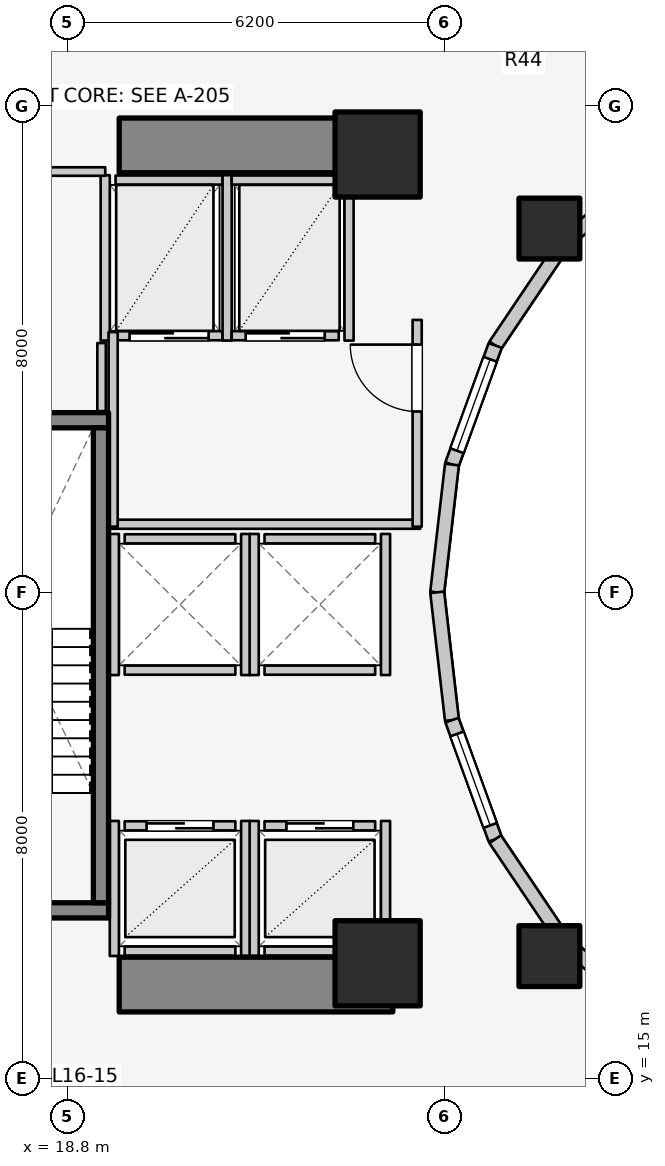
"""IFC4 building model, lengths in metres.
Left out: names, types, materials, properties, quantities, classifications, styles, units other than length and angle.
Written with IfcOpenShell. Run it as: python <this file> out.ifc"""

import sys

from ifc_helpers import new_model, si_unit, direction, frame, frame_2d, origin, origin_2d, place, context, subcontext, project, spatial, rectangle, extrude, element, fill, save


model = new_model("IFC4")
c1 = context("Model", 3, precision=1e-05, world=origin(), true_north=direction((0.0, 1.0)))
c2 = subcontext(c1, "Body", "Model", "MODEL_VIEW")
j1 = project(units=[si_unit("LENGTHUNIT", "METRE"), si_unit("PLANEANGLEUNIT", "RADIAN")], contexts=[c1])
p1 = place(None, origin())
s1 = spatial("IfcSite", under=j1, at=p1, CompositionType="ELEMENT")
p2 = place(p1, origin())
s2 = spatial("IfcBuilding", under=s1, at=p2, CompositionType="ELEMENT")
p3 = place(p2, frame((0.0, 0.0, 55.5)))
s3 = spatial("IfcBuildingStorey", under=s2, at=p3, CompositionType="ELEMENT", Elevation=55.5)
for number, where, z_axis, x_axis in (
    (1, (19.65, 16.55, 0.0), (0.0, 0.0, 1.0), (1.0, 0.0, 0.0)),
    (2, (19.65, 30.35, 0.0), (0.0, 0.0, 1.0), (1.0, 0.0, 0.0)),
):
    element("IfcWall", number, at=place(p3, frame(where, z_axis=z_axis, x_axis=x_axis)), inside=s3, PredefinedType="SHEAR", context=c2, shape_type="SweptSolid", body=[
        extrude(rectangle(XDim=4.5, YDim=0.9, at=frame_2d((2.25, 0.0))), origin(), (0.0, 0.0, 1.0), 3.1),
    ])
p4 = place(p3, frame((16.105, 17.77, 0.0), z_axis=(0.0, 0.0, 1.0), x_axis=(1.0, 0.0, 0.0)))
e3 = element("IfcWall", 3, at=p4, inside=s3, PredefinedType="SOLIDWALL", context=c2, shape_type="SweptSolid", body=[
    extrude(rectangle(XDim=3.37, YDim=0.25, at=frame_2d((1.685, 0.0))), origin(), (0.0, 0.0, 1.0), 3.1),
])
p5 = place(p4, frame((1.135, 0.0, 0.0)))
e4 = element("IfcOpeningElement", 4, at=p5, cuts=e3, PredefinedType="OPENING", context=c2, shape_type="SweptSolid", body=[
    extrude(rectangle(XDim=1.1, YDim=2.1, at=frame_2d((0.55, 1.05))), frame((0.0, 0.135, 0.0), z_axis=(0.0, -1.0, 0.0), x_axis=(1.0, 0.0, 0.0)), (0.0, 0.0, 1.0), 0.27),
])
p6 = place(p3, frame((16.105, 25.83, 0.0), z_axis=(0.0, 0.0, 1.0), x_axis=(1.0, 0.0, 0.0)))
e5 = element("IfcWall", 5, at=p6, inside=s3, PredefinedType="SOLIDWALL", context=c2, shape_type="SweptSolid", body=[
    extrude(rectangle(XDim=3.37, YDim=0.25, at=frame_2d((1.685, 0.0))), origin(), (0.0, 0.0, 1.0), 3.1),
])
p7 = place(p3, frame((19.35, 17.895, 0.0), z_axis=(0.0, 0.0, 1.0), x_axis=(0.0, 1.0, 0.0)))
e6 = element("IfcWall", 6, at=p7, inside=s3, PredefinedType="SOLIDWALL", context=c2, shape_type="SweptSolid", body=[
    extrude(rectangle(XDim=7.81, YDim=0.25, at=frame_2d((3.905, 0.0))), origin(), (0.0, 0.0, 1.0), 3.1),
])
for number, where, z_axis, x_axis in (
    (7, (23.9, 16.9, 0.0), (0.0, 0.0, 1.0), (1.0, 0.0, 0.0)),
    (8, (23.9, 30.2, 0.0), (0.0, 0.0, 1.0), (1.0, 0.0, 0.0)),
):
    element("IfcColumn", number, at=place(p3, frame(where, z_axis=z_axis, x_axis=x_axis)), inside=s3, PredefinedType="COLUMN", context=c2, shape_type="SweptSolid", body=[
        extrude(rectangle(XDim=1.4, YDim=1.4, at=origin_2d()), origin(), (0.0, 0.0, 1.0), 3.1),
    ])
for number, where, z_axis, x_axis in (
    (9, (26.725, 28.982, 0.0), (0.0, 0.0, 1.0), (1.0, 0.0, 0.0)),
    (10, (26.725, 17.018, 0.0), (0.0, 0.0, 1.0), (1.0, 0.0, 0.0)),
):
    element("IfcColumn", number, at=place(p3, frame(where, z_axis=z_axis, x_axis=x_axis)), inside=s3, PredefinedType="COLUMN", context=c2, shape_type="SweptSolid", body=[
        extrude(rectangle(XDim=1.0, YDim=1.0, at=origin_2d()), origin(), (0.0, 0.0, 1.0), 3.1),
    ])
p8 = place(p3, frame((28.44, 30.032, 0.0), z_axis=(0.0, 0.0, 1.0), x_axis=(-0.752576694707, -0.658504607869, 0.0)))
e11 = element("IfcWall", 11, at=p8, inside=s3, PredefinedType="STANDARD", context=c2, shape_type="SweptSolid", body=[
    extrude(rectangle(XDim=1.959, YDim=0.23, at=frame_2d((0.98, 0.0))), origin(), (0.0, 0.0, 1.0), 2.16),
])
p9 = place(p3, frame((26.965, 28.742, 0.0), z_axis=(0.0, 0.0, 1.0), x_axis=(-0.558197800898, -0.829707909492, 0.0)))
e12 = element("IfcWall", 12, at=p9, inside=s3, PredefinedType="STANDARD", context=c2, shape_type="SweptSolid", body=[
    extrude(rectangle(XDim=2.027, YDim=0.23, at=frame_2d((1.013, 0.0))), origin(), (0.0, 0.0, 1.0), 2.16),
])
p10 = place(p3, frame((25.834, 27.06, 0.0), z_axis=(0.0, 0.0, 1.0), x_axis=(-0.341423187295, -0.93990968033, 0.0)))
e13 = element("IfcWall", 13, at=p10, inside=s3, PredefinedType="STANDARD", context=c2, shape_type="SweptSolid", body=[
    extrude(rectangle(XDim=2.084, YDim=0.23, at=frame_2d((1.042, 0.0))), origin(), (0.0, 0.0, 1.0), 2.84),
])
p11 = place(p10, frame((0.242, 0.0, 0.85)))
e14 = element("IfcOpeningElement", 14, at=p11, cuts=e13, PredefinedType="OPENING", context=c2, shape_type="SweptSolid", body=[
    extrude(rectangle(XDim=1.6, YDim=1.65, at=frame_2d((0.8, 0.825))), frame((0.0, 0.125, 0.0), z_axis=(0.0, -1.0, 0.0), x_axis=(1.0, 0.0, 0.0)), (0.0, 0.0, 1.0), 0.25),
])
for number, where, z_axis, x_axis in (
    (15, (25.123, 25.102, 0.0), (0.0, 0.0, 1.0), (-0.115, -0.993, 0.0)),
    (16, (24.88, 23.0, 0.0), (0.0, 0.0, 1.0), (0.115, -0.993, 0.0)),
):
    element("IfcWall", number, at=place(p3, frame(where, z_axis=z_axis, x_axis=x_axis)), inside=s3, PredefinedType="STANDARD", context=c2, shape_type="SweptSolid", body=[
        extrude(rectangle(XDim=2.115, YDim=0.23, at=frame_2d((1.058, 0.0))), origin(), (0.0, 0.0, 1.0), 2.84),
    ])
p12 = place(p3, frame((25.123, 20.898, 0.0), z_axis=(0.0, 0.0, 1.0), x_axis=(0.341423187295, -0.93990968033, 0.0)))
e17 = element("IfcWall", 17, at=p12, inside=s3, PredefinedType="STANDARD", context=c2, shape_type="SweptSolid", body=[
    extrude(rectangle(XDim=2.084, YDim=0.23, at=frame_2d((1.042, 0.0))), origin(), (0.0, 0.0, 1.0), 2.84),
])
p13 = place(p12, frame((0.242, 0.0, 0.85)))
e18 = element("IfcOpeningElement", 18, at=p13, cuts=e17, PredefinedType="OPENING", context=c2, shape_type="SweptSolid", body=[
    extrude(rectangle(XDim=1.6, YDim=1.65, at=frame_2d((0.8, 0.825))), frame((0.0, 0.125, 0.0), z_axis=(0.0, -1.0, 0.0), x_axis=(1.0, 0.0, 0.0)), (0.0, 0.0, 1.0), 0.25),
])
p14 = place(p3, frame((25.834, 18.94, 0.0), z_axis=(0.0, 0.0, 1.0), x_axis=(0.558197800898, -0.829707909492, 0.0)))
e19 = element("IfcWall", 19, at=p14, inside=s3, PredefinedType="STANDARD", context=c2, shape_type="SweptSolid", body=[
    extrude(rectangle(XDim=2.027, YDim=0.23, at=frame_2d((1.013, 0.0))), origin(), (0.0, 0.0, 1.0), 2.16),
])
p15 = place(p3, frame((26.965, 17.258, 0.0), z_axis=(0.0, 0.0, 1.0), x_axis=(0.752576694707, -0.658504607869, 0.0)))
e20 = element("IfcWall", 20, at=p15, inside=s3, PredefinedType="STANDARD", context=c2, shape_type="SweptSolid", body=[
    extrude(rectangle(XDim=1.959, YDim=0.23, at=frame_2d((0.98, 0.0))), origin(), (0.0, 0.0, 1.0), 2.16),
])
p16 = place(p3, frame((19.74, 19.16, 0.0), z_axis=(0.0, 0.0, 1.0), x_axis=(1.0, 0.0, 0.0)))
e21 = element("IfcWall", 21, at=p16, inside=s3, PredefinedType="SOLIDWALL", context=c2, shape_type="SweptSolid", body=[
    extrude(rectangle(XDim=1.82, YDim=0.15, at=frame_2d((0.91, 0.0))), origin(), (0.0, 0.0, 1.0), 2.855),
])
p17 = place(p16, frame((0.36, 0.0, 0.0)))
e22 = element("IfcOpeningElement", 22, at=p17, cuts=e21, PredefinedType="OPENING", context=c2, shape_type="SweptSolid", body=[
    extrude(rectangle(XDim=1.1, YDim=2.1, at=frame_2d((0.55, 1.05))), frame((0.0, 0.085, 0.0), z_axis=(0.0, -1.0, 0.0), x_axis=(1.0, 0.0, 0.0)), (0.0, 0.0, 1.0), 0.17),
])
p18 = place(p3, frame((19.74, 17.1, 0.0), z_axis=(0.0, 0.0, 1.0), x_axis=(1.0, 0.0, 0.0)))
e23 = element("IfcWall", 23, at=p18, inside=s3, PredefinedType="SOLIDWALL", context=c2, shape_type="SweptSolid", body=[
    extrude(rectangle(XDim=1.82, YDim=0.15, at=frame_2d((0.91, 0.0))), origin(), (0.0, 0.0, 1.0), 2.855),
])
p19 = place(p3, frame((19.57, 17.02, 0.0), z_axis=(0.0, 0.0, 1.0), x_axis=(0.0, 1.0, 0.0)))
e24 = element("IfcWall", 24, at=p19, inside=s3, PredefinedType="SOLIDWALL", context=c2, shape_type="SweptSolid", body=[
    extrude(rectangle(XDim=2.22, YDim=0.15, at=frame_2d((1.11, 0.0))), origin(), (0.0, 0.0, 1.0), 2.12),
])
p20 = place(p3, frame((21.73, 17.02, 0.0), z_axis=(0.0, 0.0, 1.0), x_axis=(0.0, 1.0, 0.0)))
e25 = element("IfcWall", 25, at=p20, inside=s3, PredefinedType="SOLIDWALL", context=c2, shape_type="SweptSolid", body=[
    extrude(rectangle(XDim=2.22, YDim=0.15, at=frame_2d((1.11, 0.0))), origin(), (0.0, 0.0, 1.0), 2.855),
])
p21 = place(p3, frame((22.04, 19.16, 0.0), z_axis=(0.0, 0.0, 1.0), x_axis=(1.0, 0.0, 0.0)))
e26 = element("IfcWall", 26, at=p21, inside=s3, PredefinedType="SOLIDWALL", context=c2, shape_type="SweptSolid", body=[
    extrude(rectangle(XDim=1.82, YDim=0.15, at=frame_2d((0.91, 0.0))), origin(), (0.0, 0.0, 1.0), 2.12),
])
p22 = place(p21, frame((0.36, 0.0, 0.0)))
e27 = element("IfcOpeningElement", 27, at=p22, cuts=e26, PredefinedType="OPENING", context=c2, shape_type="SweptSolid", body=[
    extrude(rectangle(XDim=1.1, YDim=2.1, at=frame_2d((0.55, 1.05))), frame((0.0, 0.085, 0.0), z_axis=(0.0, -1.0, 0.0), x_axis=(1.0, 0.0, 0.0)), (0.0, 0.0, 1.0), 0.17),
])
p23 = place(p3, frame((22.04, 17.1, 0.0), z_axis=(0.0, 0.0, 1.0), x_axis=(1.0, 0.0, 0.0)))
e28 = element("IfcWall", 28, at=p23, inside=s3, PredefinedType="SOLIDWALL", context=c2, shape_type="SweptSolid", body=[
    extrude(rectangle(XDim=1.82, YDim=0.15, at=frame_2d((0.91, 0.0))), origin(), (0.0, 0.0, 1.0), 2.12),
])
p24 = place(p3, frame((21.87, 17.02, 0.0), z_axis=(0.0, 0.0, 1.0), x_axis=(0.0, 1.0, 0.0)))
e29 = element("IfcWall", 29, at=p24, inside=s3, PredefinedType="SOLIDWALL", context=c2, shape_type="SweptSolid", body=[
    extrude(rectangle(XDim=2.22, YDim=0.15, at=frame_2d((1.11, 0.0))), origin(), (0.0, 0.0, 1.0), 2.855),
])
p25 = place(p3, frame((24.03, 17.02, 0.0), z_axis=(0.0, 0.0, 1.0), x_axis=(0.0, 1.0, 0.0)))
e30 = element("IfcWall", 30, at=p25, inside=s3, PredefinedType="SOLIDWALL", context=c2, shape_type="SweptSolid", body=[
    extrude(rectangle(XDim=2.22, YDim=0.15, at=frame_2d((1.11, 0.0))), origin(), (0.0, 0.0, 1.0), 2.12),
])
for number, where, z_axis, x_axis in (
    (31, (19.74, 21.72, 0.0), (0.0, 0.0, 1.0), (1.0, 0.0, 0.0)),
    (32, (19.74, 23.88, 0.0), (0.0, 0.0, 1.0), (1.0, 0.0, 0.0)),
):
    element("IfcWall", number, at=place(p3, frame(where, z_axis=z_axis, x_axis=x_axis)), inside=s3, PredefinedType="SOLIDWALL", context=c2, shape_type="SweptSolid", body=[
        extrude(rectangle(XDim=1.82, YDim=0.15, at=frame_2d((0.91, 0.0))), origin(), (0.0, 0.0, 1.0), 2.855),
    ])
for number, where, z_axis, x_axis in (
    (33, (19.57, 21.64, 0.0), (0.0, 0.0, 1.0), (0.0, 1.0, 0.0)),
    (34, (21.73, 21.64, 0.0), (0.0, 0.0, 1.0), (0.0, 1.0, 0.0)),
):
    element("IfcWall", number, at=place(p3, frame(where, z_axis=z_axis, x_axis=x_axis)), inside=s3, PredefinedType="SOLIDWALL", context=c2, shape_type="SweptSolid", body=[
        extrude(rectangle(XDim=2.32, YDim=0.15, at=frame_2d((1.16, 0.0))), origin(), (0.0, 0.0, 1.0), 2.855),
    ])
for number, where, z_axis, x_axis in (
    (35, (22.04, 21.72, 0.0), (0.0, 0.0, 1.0), (1.0, 0.0, 0.0)),
    (36, (22.04, 23.88, 0.0), (0.0, 0.0, 1.0), (1.0, 0.0, 0.0)),
):
    element("IfcWall", number, at=place(p3, frame(where, z_axis=z_axis, x_axis=x_axis)), inside=s3, PredefinedType="SOLIDWALL", context=c2, shape_type="SweptSolid", body=[
        extrude(rectangle(XDim=1.82, YDim=0.15, at=frame_2d((0.91, 0.0))), origin(), (0.0, 0.0, 1.0), 2.12),
    ])
p26 = place(p3, frame((21.87, 21.64, 0.0), z_axis=(0.0, 0.0, 1.0), x_axis=(0.0, 1.0, 0.0)))
e37 = element("IfcWall", 37, at=p26, inside=s3, PredefinedType="SOLIDWALL", context=c2, shape_type="SweptSolid", body=[
    extrude(rectangle(XDim=2.32, YDim=0.15, at=frame_2d((1.16, 0.0))), origin(), (0.0, 0.0, 1.0), 2.855),
])
p27 = place(p3, frame((24.03, 21.64, 0.0), z_axis=(0.0, 0.0, 1.0), x_axis=(0.0, 1.0, 0.0)))
e38 = element("IfcWall", 38, at=p27, inside=s3, PredefinedType="SOLIDWALL", context=c2, shape_type="SweptSolid", body=[
    extrude(rectangle(XDim=2.32, YDim=0.15, at=frame_2d((1.16, 0.0))), origin(), (0.0, 0.0, 1.0), 2.12),
])
p28 = place(p3, frame((19.59, 27.22, 0.0), z_axis=(0.0, 0.0, 1.0), x_axis=(1.0, 0.0, 0.0)))
e39 = element("IfcWall", 39, at=p28, inside=s3, PredefinedType="SOLIDWALL", context=c2, shape_type="SweptSolid", body=[
    extrude(rectangle(XDim=1.76, YDim=0.15, at=frame_2d((0.88, 0.0))), origin(), (0.0, 0.0, 1.0), 2.855),
])
p29 = place(p28, frame((0.23, 0.0, 0.0)))
e40 = element("IfcOpeningElement", 40, at=p29, cuts=e39, PredefinedType="OPENING", context=c2, shape_type="SweptSolid", body=[
    extrude(rectangle(XDim=1.3, YDim=2.1, at=frame_2d((0.65, 1.05))), frame((0.0, 0.085, 0.0), z_axis=(0.0, -1.0, 0.0), x_axis=(1.0, 0.0, 0.0)), (0.0, 0.0, 1.0), 0.17),
])
p30 = place(p3, frame((19.59, 29.78, 0.0), z_axis=(0.0, 0.0, 1.0), x_axis=(1.0, 0.0, 0.0)))
e41 = element("IfcWall", 41, at=p30, inside=s3, PredefinedType="SOLIDWALL", context=c2, shape_type="SweptSolid", body=[
    extrude(rectangle(XDim=1.76, YDim=0.15, at=frame_2d((0.88, 0.0))), origin(), (0.0, 0.0, 1.0), 2.855),
])
for number, where, z_axis, x_axis in (
    (42, (19.42, 27.14, 0.0), (0.0, 0.0, 1.0), (0.0, 1.0, 0.0)),
    (43, (21.425, 27.14, 0.0), (0.0, 0.0, 1.0), (0.0, 1.0, 0.0)),
):
    element("IfcWall", number, at=place(p3, frame(where, z_axis=z_axis, x_axis=x_axis)), inside=s3, PredefinedType="SOLIDWALL", context=c2, shape_type="SweptSolid", body=[
        extrude(rectangle(XDim=2.72, YDim=0.15, at=frame_2d((1.36, 0.0))), origin(), (0.0, 0.0, 1.0), 2.855),
    ])
p31 = place(p3, frame((21.5, 27.22, 0.0), z_axis=(0.0, 0.0, 1.0), x_axis=(1.0, 0.0, 0.0)))
e44 = element("IfcWall", 44, at=p31, inside=s3, PredefinedType="SOLIDWALL", context=c2, shape_type="SweptSolid", body=[
    extrude(rectangle(XDim=1.76, YDim=0.15, at=frame_2d((0.88, 0.0))), origin(), (0.0, 0.0, 1.0), 2.855),
])
p32 = place(p31, frame((0.23, 0.0, 0.0)))
e45 = element("IfcOpeningElement", 45, at=p32, cuts=e44, PredefinedType="OPENING", context=c2, shape_type="SweptSolid", body=[
    extrude(rectangle(XDim=1.3, YDim=2.1, at=frame_2d((0.65, 1.05))), frame((0.0, 0.085, 0.0), z_axis=(0.0, -1.0, 0.0), x_axis=(1.0, 0.0, 0.0)), (0.0, 0.0, 1.0), 0.17),
])
p33 = place(p3, frame((21.5, 29.78, 0.0), z_axis=(0.0, 0.0, 1.0), x_axis=(1.0, 0.0, 0.0)))
e46 = element("IfcWall", 46, at=p33, inside=s3, PredefinedType="SOLIDWALL", context=c2, shape_type="SweptSolid", body=[
    extrude(rectangle(XDim=1.76, YDim=0.15, at=frame_2d((0.88, 0.0))), origin(), (0.0, 0.0, 1.0), 2.855),
])
p34 = place(p3, frame((23.43, 27.14, 0.0), z_axis=(0.0, 0.0, 1.0), x_axis=(0.0, 1.0, 0.0)))
e47 = element("IfcWall", 47, at=p34, inside=s3, PredefinedType="SOLIDWALL", context=c2, shape_type="SweptSolid", body=[
    extrude(rectangle(XDim=2.72, YDim=0.15, at=frame_2d((1.36, 0.0))), origin(), (0.0, 0.0, 1.0), 2.855),
])
p35 = place(p3, frame((19.52, 24.12, 0.0), z_axis=(0.0, 0.0, 1.0), x_axis=(1.0, 0.0, 0.0)))
e48 = element("IfcWall", 48, at=p35, inside=s3, PredefinedType="PARTITIONING", context=c2, shape_type="SweptSolid", body=[
    extrude(rectangle(XDim=5.08, YDim=0.15, at=frame_2d((2.54, 0.0))), origin(), (0.0, 0.0, 1.0), 2.12),
])
p36 = place(p3, frame((19.55, 24.08, 0.0), z_axis=(0.0, 0.0, 1.0), x_axis=(0.0, 1.0, 0.0)))
e49 = element("IfcWall", 49, at=p36, inside=s3, PredefinedType="PARTITIONING", context=c2, shape_type="SweptSolid", body=[
    extrude(rectangle(XDim=3.2, YDim=0.15, at=frame_2d((1.6, 0.0))), origin(), (0.0, 0.0, 1.0), 2.855),
])
p37 = place(p3, frame((24.55, 24.08, 0.0), z_axis=(0.0, 0.0, 1.0), x_axis=(0.0, 1.0, 0.0)))
e50 = element("IfcWall", 50, at=p37, inside=s3, PredefinedType="PARTITIONING", context=c2, shape_type="SweptSolid", body=[
    extrude(rectangle(XDim=3.4, YDim=0.15, at=frame_2d((1.7, 0.0))), origin(), (0.0, 0.0, 1.0), 2.855),
])
p38 = place(p37, frame((1.894, 0.0, 0.0)))
e51 = element("IfcOpeningElement", 51, at=p38, cuts=e50, PredefinedType="OPENING", context=c2, shape_type="SweptSolid", body=[
    extrude(rectangle(XDim=1.1, YDim=2.1, at=frame_2d((0.55, 1.05))), frame((0.0, 0.085, 0.0), z_axis=(0.0, -1.0, 0.0), x_axis=(1.0, 0.0, 0.0)), (0.0, 0.0, 1.0), 0.17),
])
p39 = place(p3, frame((16.12, 29.92, 0.0), z_axis=(0.0, 0.0, 1.0), x_axis=(1.0, 0.0, 0.0)))
e52 = element("IfcWall", 52, at=p39, inside=s3, PredefinedType="PLUMBINGWALL", context=c2, shape_type="SweptSolid", body=[
    extrude(rectangle(XDim=3.3, YDim=0.14, at=frame_2d((1.65, 0.0))), origin(), (0.0, 0.0, 1.0), 2.855),
])
p40 = place(p39, frame((1.516, 0.0, 0.0)))
e53 = element("IfcOpeningElement", 53, at=p40, cuts=e52, PredefinedType="OPENING", context=c2, shape_type="SweptSolid", body=[
    extrude(rectangle(XDim=0.85, YDim=2.05, at=frame_2d((0.425, 1.025))), frame((0.0, 0.08, 0.0), z_axis=(0.0, -1.0, 0.0), x_axis=(1.0, 0.0, 0.0)), (0.0, 0.0, 1.0), 0.16),
])
p41 = place(p3, frame((19.36, 25.98, 0.0), z_axis=(0.0, 0.0, 1.0), x_axis=(0.0, 1.0, 0.0)))
e54 = element("IfcWall", 54, at=p41, inside=s3, PredefinedType="PLUMBINGWALL", context=c2, shape_type="SweptSolid", body=[
    extrude(rectangle(XDim=1.12, YDim=0.14, at=frame_2d((0.56, 0.0))), origin(), (0.0, 0.0, 1.0), 2.855),
])
p42 = place(p11, origin())
e55 = element("IfcWindow", 55, at=p42, inside=s3, PartitioningType="SINGLE_PANEL", PredefinedType="WINDOW", context=c2, shape_type="SweptSolid", body=[
    extrude(rectangle(XDim=1.6, YDim=1.65, at=frame_2d((0.8, 0.825))), frame((0.0, 0.03, 0.0), z_axis=(0.0, -1.0, 0.0), x_axis=(1.0, 0.0, 0.0)), (0.0, 0.0, 1.0), 0.06),
])
fill(e14, e55)
p43 = place(p13, origin())
e56 = element("IfcWindow", 56, at=p43, inside=s3, PartitioningType="SINGLE_PANEL", PredefinedType="WINDOW", context=c2, shape_type="SweptSolid", body=[
    extrude(rectangle(XDim=1.6, YDim=1.65, at=frame_2d((0.8, 0.825))), frame((0.0, 0.03, 0.0), z_axis=(0.0, -1.0, 0.0), x_axis=(1.0, 0.0, 0.0)), (0.0, 0.0, 1.0), 0.06),
])
fill(e18, e56)
p44 = place(p17, origin())
e57 = element("IfcDoor", 57, at=p44, inside=s3, OperationType="DOUBLE_DOOR_SLIDING", PredefinedType="DOOR", context=c2, shape_type="SweptSolid", body=[
    extrude(rectangle(XDim=1.1, YDim=2.1, at=frame_2d((0.55, 1.05))), frame((0.0, 0.025, 0.0), z_axis=(0.0, -1.0, 0.0), x_axis=(1.0, 0.0, 0.0)), (0.0, 0.0, 1.0), 0.05),
])
fill(e22, e57)
p45 = place(p22, origin())
e58 = element("IfcDoor", 58, at=p45, inside=s3, OperationType="DOUBLE_DOOR_SLIDING", PredefinedType="DOOR", context=c2, shape_type="SweptSolid", body=[
    extrude(rectangle(XDim=1.1, YDim=2.1, at=frame_2d((0.55, 1.05))), frame((0.0, 0.025, 0.0), z_axis=(0.0, -1.0, 0.0), x_axis=(1.0, 0.0, 0.0)), (0.0, 0.0, 1.0), 0.05),
])
fill(e27, e58)
p46 = place(p29, origin())
e59 = element("IfcDoor", 59, at=p46, inside=s3, OperationType="DOUBLE_DOOR_SLIDING", PredefinedType="DOOR", context=c2, shape_type="SweptSolid", body=[
    extrude(rectangle(XDim=1.3, YDim=2.1, at=frame_2d((0.65, 1.05))), frame((0.0, 0.025, 0.0), z_axis=(0.0, -1.0, 0.0), x_axis=(1.0, 0.0, 0.0)), (0.0, 0.0, 1.0), 0.05),
])
fill(e40, e59)
p47 = place(p32, origin())
e60 = element("IfcDoor", 60, at=p47, inside=s3, OperationType="DOUBLE_DOOR_SLIDING", PredefinedType="DOOR", context=c2, shape_type="SweptSolid", body=[
    extrude(rectangle(XDim=1.3, YDim=2.1, at=frame_2d((0.65, 1.05))), frame((0.0, 0.025, 0.0), z_axis=(0.0, -1.0, 0.0), x_axis=(1.0, 0.0, 0.0)), (0.0, 0.0, 1.0), 0.05),
])
fill(e45, e60)
p48 = place(p38, origin())
e61 = element("IfcDoor", 61, at=p48, inside=s3, OperationType="SINGLE_SWING_RIGHT", PredefinedType="DOOR", context=c2, shape_type="SweptSolid", body=[
    extrude(rectangle(XDim=1.1, YDim=2.1, at=frame_2d((0.55, 1.05))), frame((0.0, 0.025, 0.0), z_axis=(0.0, -1.0, 0.0), x_axis=(1.0, 0.0, 0.0)), (0.0, 0.0, 1.0), 0.05),
])
fill(e51, e61)
save(model, sys.argv[1])
